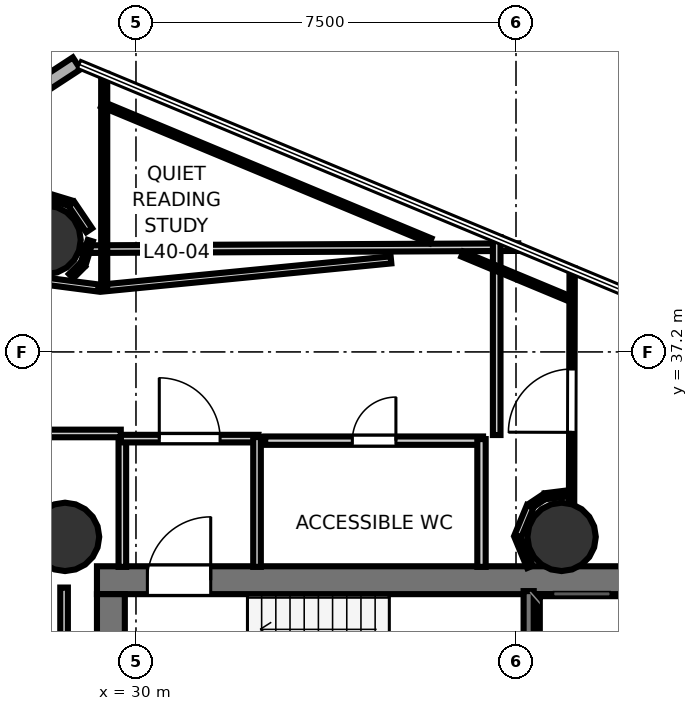
"""IFC4 building model, lengths in metres.
Left out: names, types, materials, properties, quantities, classifications, styles, units other than length and angle.
Written with IfcOpenShell. Run it as: python <this file> out.ifc"""

import sys

from ifc_helpers import new_model, si_unit, direction, frame, frame_2d, origin, origin_2d, place, context, subcontext, project, spatial, rectangle, hollow_circle, extrude, element, fill, save


model = new_model("IFC4")
c1 = context("Model", 3, precision=1e-05, world=origin(), true_north=direction((0.0, 1.0)))
c2 = subcontext(c1, "Body", "Model", "MODEL_VIEW")
j1 = project(units=[si_unit("LENGTHUNIT", "METRE"), si_unit("PLANEANGLEUNIT", "RADIAN")], contexts=[c1])
p1 = place(None, origin())
s1 = spatial("IfcSite", under=j1, at=p1, CompositionType="ELEMENT")
p2 = place(p1, origin())
s2 = spatial("IfcBuilding", under=s1, at=p2, CompositionType="ELEMENT")
p3 = place(p2, frame((0.0, 0.0, 158.7)))
s3 = spatial("IfcBuildingStorey", under=s2, at=p3, CompositionType="ELEMENT", Elevation=158.7)
p4 = place(p3, frame((29.23, 32.695, 0.0), z_axis=(0.0, 0.0, 1.0), x_axis=(1.0, 0.0, 0.0)))
e1 = element("IfcWall", 1, at=p4, inside=s3, PredefinedType="SHEAR", context=c2, shape_type="SweptSolid", body=[
    extrude(rectangle(XDim=10.62, YDim=0.55, at=frame_2d((5.31, 0.0))), origin(), (0.0, 0.0, 1.0), 3.52),
])
p5 = place(p4, frame((0.995, 0.0, 0.0)))
e2 = element("IfcOpeningElement", 2, at=p5, cuts=e1, PredefinedType="OPENING", context=c2, shape_type="SweptSolid", body=[
    extrude(rectangle(XDim=1.25, YDim=2.15, at=frame_2d((0.625, 1.075))), frame((0.0, 0.285, 0.0), z_axis=(0.0, -1.0, 0.0), x_axis=(1.0, 0.0, 0.0)), (0.0, 0.0, 1.0), 0.57),
])
p6 = place(p3, frame((29.505, 24.98, 0.0), z_axis=(0.0, 0.0, 1.0), x_axis=(0.0, 1.0, 0.0)))
e3 = element("IfcWall", 3, at=p6, inside=s3, PredefinedType="SHEAR", context=c2, shape_type="SweptSolid", body=[
    extrude(rectangle(XDim=7.44, YDim=0.55, at=frame_2d((3.72, 0.0))), origin(), (0.0, 0.0, 1.0), 3.52),
])
p7 = place(p3, frame((38.18, 24.98, 0.0), z_axis=(0.0, 0.0, 1.0), x_axis=(0.0, 1.0, 0.0)))
e4 = element("IfcWall", 4, at=p7, inside=s3, PredefinedType="SHEAR", context=c2, shape_type="SweptSolid", body=[
    extrude(rectangle(XDim=7.44, YDim=0.5, at=frame_2d((3.72, 0.0))), origin(), (0.0, 0.0, 1.0), 3.52),
])
for number, where, z_axis, x_axis in (
    (5, (28.6, 33.55, 0.0), (0.0, 0.0, 1.0), (1.0, 0.0, 0.0)),
    (6, (38.4, 33.55, 0.0), (0.0, 0.0, 1.0), (1.0, 0.0, 0.0)),
    (7, (28.235, 39.411, 0.0), (0.0, 0.0, 1.0), (1.0, 0.0, 0.0)),
):
    element("IfcColumn", number, at=place(p3, frame(where, z_axis=z_axis, x_axis=x_axis)), inside=s3, PredefinedType="COLUMN", context=c2, shape_type="SweptSolid", body=[
        extrude(hollow_circle(Radius=0.675, WallThickness=0.032, at=origin_2d()), origin(), (0.0, 0.0, 1.0), 3.7),
    ])
p8 = place(p3, frame((28.83, 42.894, 0.0), z_axis=(0.0, 0.0, 1.0), x_axis=(-0.837273291315, -0.5467846337, 0.0)))
e8 = element("IfcWall", 8, at=p8, inside=s3, PredefinedType="SOLIDWALL", context=c2, shape_type="SweptSolid", body=[
    extrude(rectangle(XDim=9.004, YDim=0.28, at=frame_2d((4.502, 0.0))), origin(), (0.0, 0.0, 1.0), 3.52),
])
p9 = place(p8, frame((1.951, 0.0, 0.85)))
e9 = element("IfcOpeningElement", 9, at=p9, cuts=e8, PredefinedType="OPENING", context=c2, shape_type="SweptSolid", body=[
    extrude(rectangle(XDim=1.5, YDim=2.1, at=frame_2d((0.75, 1.05))), frame((0.0, 0.15, 0.0), z_axis=(0.0, -1.0, 0.0), x_axis=(1.0, 0.0, 0.0)), (0.0, 0.0, 1.0), 0.3),
])
p10 = place(p3, frame((37.75, 30.12, 0.0), z_axis=(0.0, 0.0, 1.0), x_axis=(0.0, 1.0, 0.0)))
e10 = element("IfcWall", 10, at=p10, inside=s3, PredefinedType="SOLIDWALL", context=c2, shape_type="SweptSolid", body=[
    extrude(rectangle(XDim=2.36, YDim=0.2, at=frame_2d((1.18, 0.0))), origin(), (0.0, 0.0, 1.0), 3.52),
])
p11 = place(p3, frame((29.731, 32.958, 0.0), z_axis=(0.0, 0.0, 1.0), x_axis=(0.0, 1.0, 0.0)))
e11 = element("IfcWall", 11, at=p11, inside=s3, PredefinedType="PARTITIONING", context=c2, shape_type="SweptSolid", body=[
    extrude(rectangle(XDim=2.562, YDim=0.15, at=frame_2d((1.281, 0.0))), origin(), (0.0, 0.0, 1.0), 2.84),
])
p12 = place(p3, frame((29.7, 35.489, 0.0), z_axis=(0.0, 0.0, 1.0), x_axis=(1.0, 0.0, 0.0)))
e12 = element("IfcWall", 12, at=p12, inside=s3, PredefinedType="PARTITIONING", context=c2, shape_type="SweptSolid", body=[
    extrude(rectangle(XDim=2.72, YDim=0.15, at=frame_2d((1.36, 0.0))), origin(), (0.0, 0.0, 1.0), 2.84),
])
p13 = place(p12, frame((0.76, 0.0, 0.0)))
e13 = element("IfcOpeningElement", 13, at=p13, cuts=e12, PredefinedType="OPENING", context=c2, shape_type="SweptSolid", body=[
    extrude(rectangle(XDim=1.2, YDim=2.15, at=frame_2d((0.6, 1.075))), frame((0.0, 0.085, 0.0), z_axis=(0.0, -1.0, 0.0), x_axis=(1.0, 0.0, 0.0)), (0.0, 0.0, 1.0), 0.17),
])
p14 = place(p3, frame((32.389, 35.52, 0.0), z_axis=(0.0, 0.0, 1.0), x_axis=(0.0, -1.0, 0.0)))
e14 = element("IfcWall", 14, at=p14, inside=s3, PredefinedType="PARTITIONING", context=c2, shape_type="SweptSolid", body=[
    extrude(rectangle(XDim=2.562, YDim=0.15, at=frame_2d((1.281, 0.0))), origin(), (0.0, 0.0, 1.0), 2.84),
])
p15 = place(p3, frame((32.55, 35.449, 0.0), z_axis=(0.0, 0.0, 1.0), x_axis=(1.0, 0.0, 0.0)))
e15 = element("IfcWall", 15, at=p15, inside=s3, PredefinedType="PLUMBINGWALL", context=c2, shape_type="SweptSolid", body=[
    extrude(rectangle(XDim=4.3, YDim=0.165, at=frame_2d((2.15, 0.0))), origin(), (0.0, 0.0, 1.0), 2.84),
])
p16 = place(p15, frame((1.72, 0.0, 0.0)))
e16 = element("IfcOpeningElement", 16, at=p16, cuts=e15, PredefinedType="OPENING", context=c2, shape_type="SweptSolid", body=[
    extrude(rectangle(XDim=0.86, YDim=2.05, at=frame_2d((0.43, 1.025))), frame((0.0, 0.093, 0.0), z_axis=(0.0, -1.0, 0.0), x_axis=(1.0, 0.0, 0.0)), (0.0, 0.0, 1.0), 0.185),
])
p17 = place(p3, frame((36.819, 35.48, 0.0), z_axis=(0.0, 0.0, 1.0), x_axis=(0.0, -1.0, 0.0)))
e17 = element("IfcWall", 17, at=p17, inside=s3, PredefinedType="PLUMBINGWALL", context=c2, shape_type="SweptSolid", body=[
    extrude(rectangle(XDim=2.522, YDim=0.165, at=frame_2d((1.261, 0.0))), origin(), (0.0, 0.0, 1.0), 2.84),
])
p18 = place(p3, frame((28.581, 24.68, 0.0), z_axis=(0.0, 0.0, 1.0), x_axis=(0.0, 1.0, 0.0)))
e18 = element("IfcWall", 18, at=p18, inside=s3, PredefinedType="PARTITIONING", context=c2, shape_type="SweptSolid", body=[
    extrude(rectangle(XDim=7.87, YDim=0.15, at=frame_2d((3.935, 0.0))), origin(), (0.0, 0.0, 1.0), 2.84),
])
p19 = place(p3, frame((23.174, 39.201, 0.0), z_axis=(0.0, 0.0, 1.0), x_axis=(0.999989166238, 0.004654826148, 0.0)))
e19 = element("IfcWall", 19, at=p19, inside=s3, PredefinedType="PARTITIONING", context=c2, shape_type="SweptSolid", body=[
    extrude(rectangle(XDim=14.371, YDim=0.15, at=frame_2d((7.186, 0.0))), origin(), (0.0, 0.0, 1.0), 2.84),
])
p20 = place(p3, frame((37.119, 39.465, 0.0), z_axis=(0.0, 0.0, 1.0), x_axis=(0.0, -1.0, 0.0)))
e20 = element("IfcWall", 20, at=p20, inside=s3, PredefinedType="PARTITIONING", context=c2, shape_type="SweptSolid", body=[
    extrude(rectangle(XDim=3.905, YDim=0.15, at=frame_2d((1.953, 0.0))), origin(), (0.0, 0.0, 1.0), 2.84),
])
p21 = place(p3, frame((29.7, 35.591, 0.0), z_axis=(0.0, 0.0, 1.0), x_axis=(-1.0, 0.0, 0.0)))
e21 = element("IfcWall", 21, at=p21, inside=s3, PredefinedType="PARTITIONING", context=c2, shape_type="SweptSolid", body=[
    extrude(rectangle(XDim=3.12, YDim=0.15, at=frame_2d((1.56, 0.0))), origin(), (0.0, 0.0, 1.0), 2.84),
])
p22 = place(p3, frame((38.594, 32.958, 0.0), z_axis=(0.0, 0.0, 1.0), x_axis=(0.002446602671, 0.999997007063, 0.0)))
e22 = element("IfcWall", 22, at=p22, inside=s3, PredefinedType="PARTITIONING", context=c2, shape_type="SweptSolid", body=[
    extrude(rectangle(XDim=5.887, YDim=0.105, at=frame_2d((2.944, 0.0))), origin(), (0.0, 0.0, 1.0), 2.84),
])
p23 = place(p22, frame((2.655, 0.0, 0.0)))
e23 = element("IfcOpeningElement", 23, at=p23, cuts=e22, PredefinedType="OPENING", context=c2, shape_type="SweptSolid", body=[
    extrude(rectangle(XDim=1.25, YDim=2.2, at=frame_2d((0.625, 1.1))), frame((0.0, 0.062, 0.0), z_axis=(0.0, -1.0, 0.0), x_axis=(1.0, 0.0, 0.0)), (0.0, 0.0, 1.0), 0.125),
])
p24 = place(p3, frame((35.033, 39.016, 0.0), z_axis=(0.0, 0.0, 1.0), x_axis=(-0.995275640249, -0.097089648918, 0.0)))
e24 = element("IfcWall", 24, at=p24, inside=s3, PredefinedType="PARTITIONING", context=c2, shape_type="SweptSolid", body=[
    extrude(rectangle(XDim=5.718, YDim=0.14, at=frame_2d((2.859, 0.0))), origin(), (0.0, 0.0, 1.0), 2.84),
])
p25 = place(p3, frame((29.373, 38.43, 0.0), z_axis=(0.0, 0.0, 1.0), x_axis=(0.0, 1.0, 0.0)))
e25 = element("IfcWall", 25, at=p25, inside=s3, PredefinedType="PARTITIONING", context=c2, shape_type="SweptSolid", body=[
    extrude(rectangle(XDim=4.258, YDim=0.12, at=frame_2d((2.129, 0.0))), origin(), (0.0, 0.0, 1.0), 2.84),
])
p26 = place(p3, frame((29.33, 42.089, 0.0), z_axis=(0.0, 0.0, 1.0), x_axis=(0.923257907731, -0.384180733265, 0.0)))
e26 = element("IfcWall", 26, at=p26, inside=s3, PredefinedType="PARTITIONING", context=c2, shape_type="SweptSolid", body=[
    extrude(rectangle(XDim=7.02, YDim=0.105, at=frame_2d((3.51, 0.0))), origin(), (0.0, 0.0, 1.0), 2.84),
])
p27 = place(p3, frame((38.502, 34.406, 0.0), z_axis=(0.0, 0.0, 1.0), x_axis=(-0.992260340351, -0.124174945004, 0.0)))
e27 = element("IfcWall", 27, at=p27, inside=s3, PredefinedType="PARTITIONING", context=c2, shape_type="SweptSolid", body=[
    extrude(rectangle(XDim=0.429, YDim=0.12, at=frame_2d((0.214, 0.0))), origin(), (0.0, 0.0, 1.0), 2.84),
])
p28 = place(p3, frame((38.063, 34.347, 0.0), z_axis=(0.0, 0.0, 1.0), x_axis=(-0.83170430964, -0.555218822922, 0.0)))
e28 = element("IfcWall", 28, at=p28, inside=s3, PredefinedType="PARTITIONING", context=c2, shape_type="SweptSolid", body=[
    extrude(rectangle(XDim=0.326, YDim=0.105, at=frame_2d((0.163, 0.0))), origin(), (0.0, 0.0, 1.0), 2.84),
])
p29 = place(p3, frame((37.781, 34.152, 0.0), z_axis=(0.0, 0.0, 1.0), x_axis=(-0.382824178437, -0.923821221018, 0.0)))
e29 = element("IfcWall", 29, at=p29, inside=s3, PredefinedType="PARTITIONING", context=c2, shape_type="SweptSolid", body=[
    extrude(rectangle(XDim=0.639, YDim=0.14, at=frame_2d((0.319, 0.0))), origin(), (0.0, 0.0, 1.0), 2.84),
])
p30 = place(p3, frame((37.536, 33.538, 0.0), z_axis=(0.0, 0.0, 1.0), x_axis=(0.382626535499, -0.923903097912, 0.0)))
e30 = element("IfcWall", 30, at=p30, inside=s3, PredefinedType="PARTITIONING", context=c2, shape_type="SweptSolid", body=[
    extrude(rectangle(XDim=0.628, YDim=0.12, at=frame_2d((0.314, 0.0))), origin(), (0.0, 0.0, 1.0), 2.84),
])
p31 = place(p3, frame((29.076, 39.602, 0.0), z_axis=(0.0, 0.0, 1.0), x_axis=(-0.559799741872, 0.828627931584, 0.0)))
e31 = element("IfcWall", 31, at=p31, inside=s3, PredefinedType="PARTITIONING", context=c2, shape_type="SweptSolid", body=[
    extrude(rectangle(XDim=0.628, YDim=0.14, at=frame_2d((0.314, 0.0))), origin(), (0.0, 0.0, 1.0), 2.84),
])
p32 = place(p3, frame((28.708, 40.135, 0.0), z_axis=(0.0, 0.0, 1.0), x_axis=(-0.95703287226, 0.289979449985, 0.0)))
e32 = element("IfcWall", 32, at=p32, inside=s3, PredefinedType="PARTITIONING", context=c2, shape_type="SweptSolid", body=[
    extrude(rectangle(XDim=0.485, YDim=0.12, at=frame_2d((0.242, 0.0))), origin(), (0.0, 0.0, 1.0), 2.84),
])
p33 = place(p3, frame((28.721, 38.695, 0.0), z_axis=(0.0, 0.0, 1.0), x_axis=(0.707106781187, 0.707106781187, 0.0)))
e33 = element("IfcWall", 33, at=p33, inside=s3, PredefinedType="PARTITIONING", context=c2, shape_type="SweptSolid", body=[
    extrude(rectangle(XDim=0.326, YDim=0.12, at=frame_2d((0.163, 0.0))), origin(), (0.0, 0.0, 1.0), 2.84),
])
p34 = place(p3, frame((28.959, 38.938, 0.0), z_axis=(0.0, 0.0, 1.0), x_axis=(0.292866596221, 0.956153312402, 0.0)))
e34 = element("IfcWall", 34, at=p34, inside=s3, PredefinedType="PARTITIONING", context=c2, shape_type="SweptSolid", body=[
    extrude(rectangle(XDim=0.479, YDim=0.105, at=frame_2d((0.239, 0.0))), origin(), (0.0, 0.0, 1.0), 2.84),
])
p35 = place(p3, frame((29.258, 38.461, 0.0), z_axis=(0.0, 0.0, 1.0), x_axis=(-0.991648515984, 0.128969844331, 0.0)))
e35 = element("IfcWall", 35, at=p35, inside=s3, PredefinedType="PARTITIONING", context=c2, shape_type="SweptSolid", body=[
    extrude(rectangle(XDim=3.956, YDim=0.14, at=frame_2d((1.978, 0.0))), origin(), (0.0, 0.0, 1.0), 2.84),
])
p36 = place(p3, frame((36.441, 39.13, 0.0), z_axis=(0.0, 0.0, 1.0), x_axis=(0.923215709741, -0.384282127202, 0.0)))
e36 = element("IfcWall", 36, at=p36, inside=s3, PredefinedType="PARTITIONING", context=c2, shape_type="SweptSolid", body=[
    extrude(rectangle(XDim=2.237, YDim=0.105, at=frame_2d((1.119, 0.0))), origin(), (0.0, 0.0, 1.0), 2.84),
])
p37 = place(p5, origin())
e37 = element("IfcDoor", 37, at=p37, inside=s3, OperationType="SINGLE_SWING_RIGHT", PredefinedType="DOOR", context=c2, shape_type="SweptSolid", body=[
    extrude(rectangle(XDim=1.25, YDim=2.15, at=frame_2d((0.625, 1.075))), frame((0.0, 0.025, 0.0), z_axis=(0.0, -1.0, 0.0), x_axis=(1.0, 0.0, 0.0)), (0.0, 0.0, 1.0), 0.05),
])
fill(e2, e37)
p38 = place(p13, origin())
e38 = element("IfcDoor", 38, at=p38, inside=s3, OperationType="SINGLE_SWING_LEFT", PredefinedType="DOOR", context=c2, shape_type="SweptSolid", body=[
    extrude(rectangle(XDim=1.2, YDim=2.15, at=frame_2d((0.6, 1.075))), frame((0.0, 0.025, 0.0), z_axis=(0.0, -1.0, 0.0), x_axis=(1.0, 0.0, 0.0)), (0.0, 0.0, 1.0), 0.05),
])
fill(e13, e38)
p39 = place(p16, origin())
e39 = element("IfcDoor", 39, at=p39, inside=s3, OperationType="SINGLE_SWING_RIGHT", PredefinedType="DOOR", context=c2, shape_type="SweptSolid", body=[
    extrude(rectangle(XDim=0.86, YDim=2.05, at=frame_2d((0.43, 1.025))), frame((0.0, 0.025, 0.0), z_axis=(0.0, -1.0, 0.0), x_axis=(1.0, 0.0, 0.0)), (0.0, 0.0, 1.0), 0.05),
])
fill(e16, e39)
p40 = place(p23, origin())
e40 = element("IfcDoor", 40, at=p40, inside=s3, OperationType="SINGLE_SWING_LEFT", PredefinedType="DOOR", context=c2, shape_type="SweptSolid", body=[
    extrude(rectangle(XDim=1.25, YDim=2.2, at=frame_2d((0.625, 1.1))), frame((0.0, 0.025, 0.0), z_axis=(0.0, -1.0, 0.0), x_axis=(1.0, 0.0, 0.0)), (0.0, 0.0, 1.0), 0.05),
])
fill(e23, e40)
save(model, sys.argv[1])
